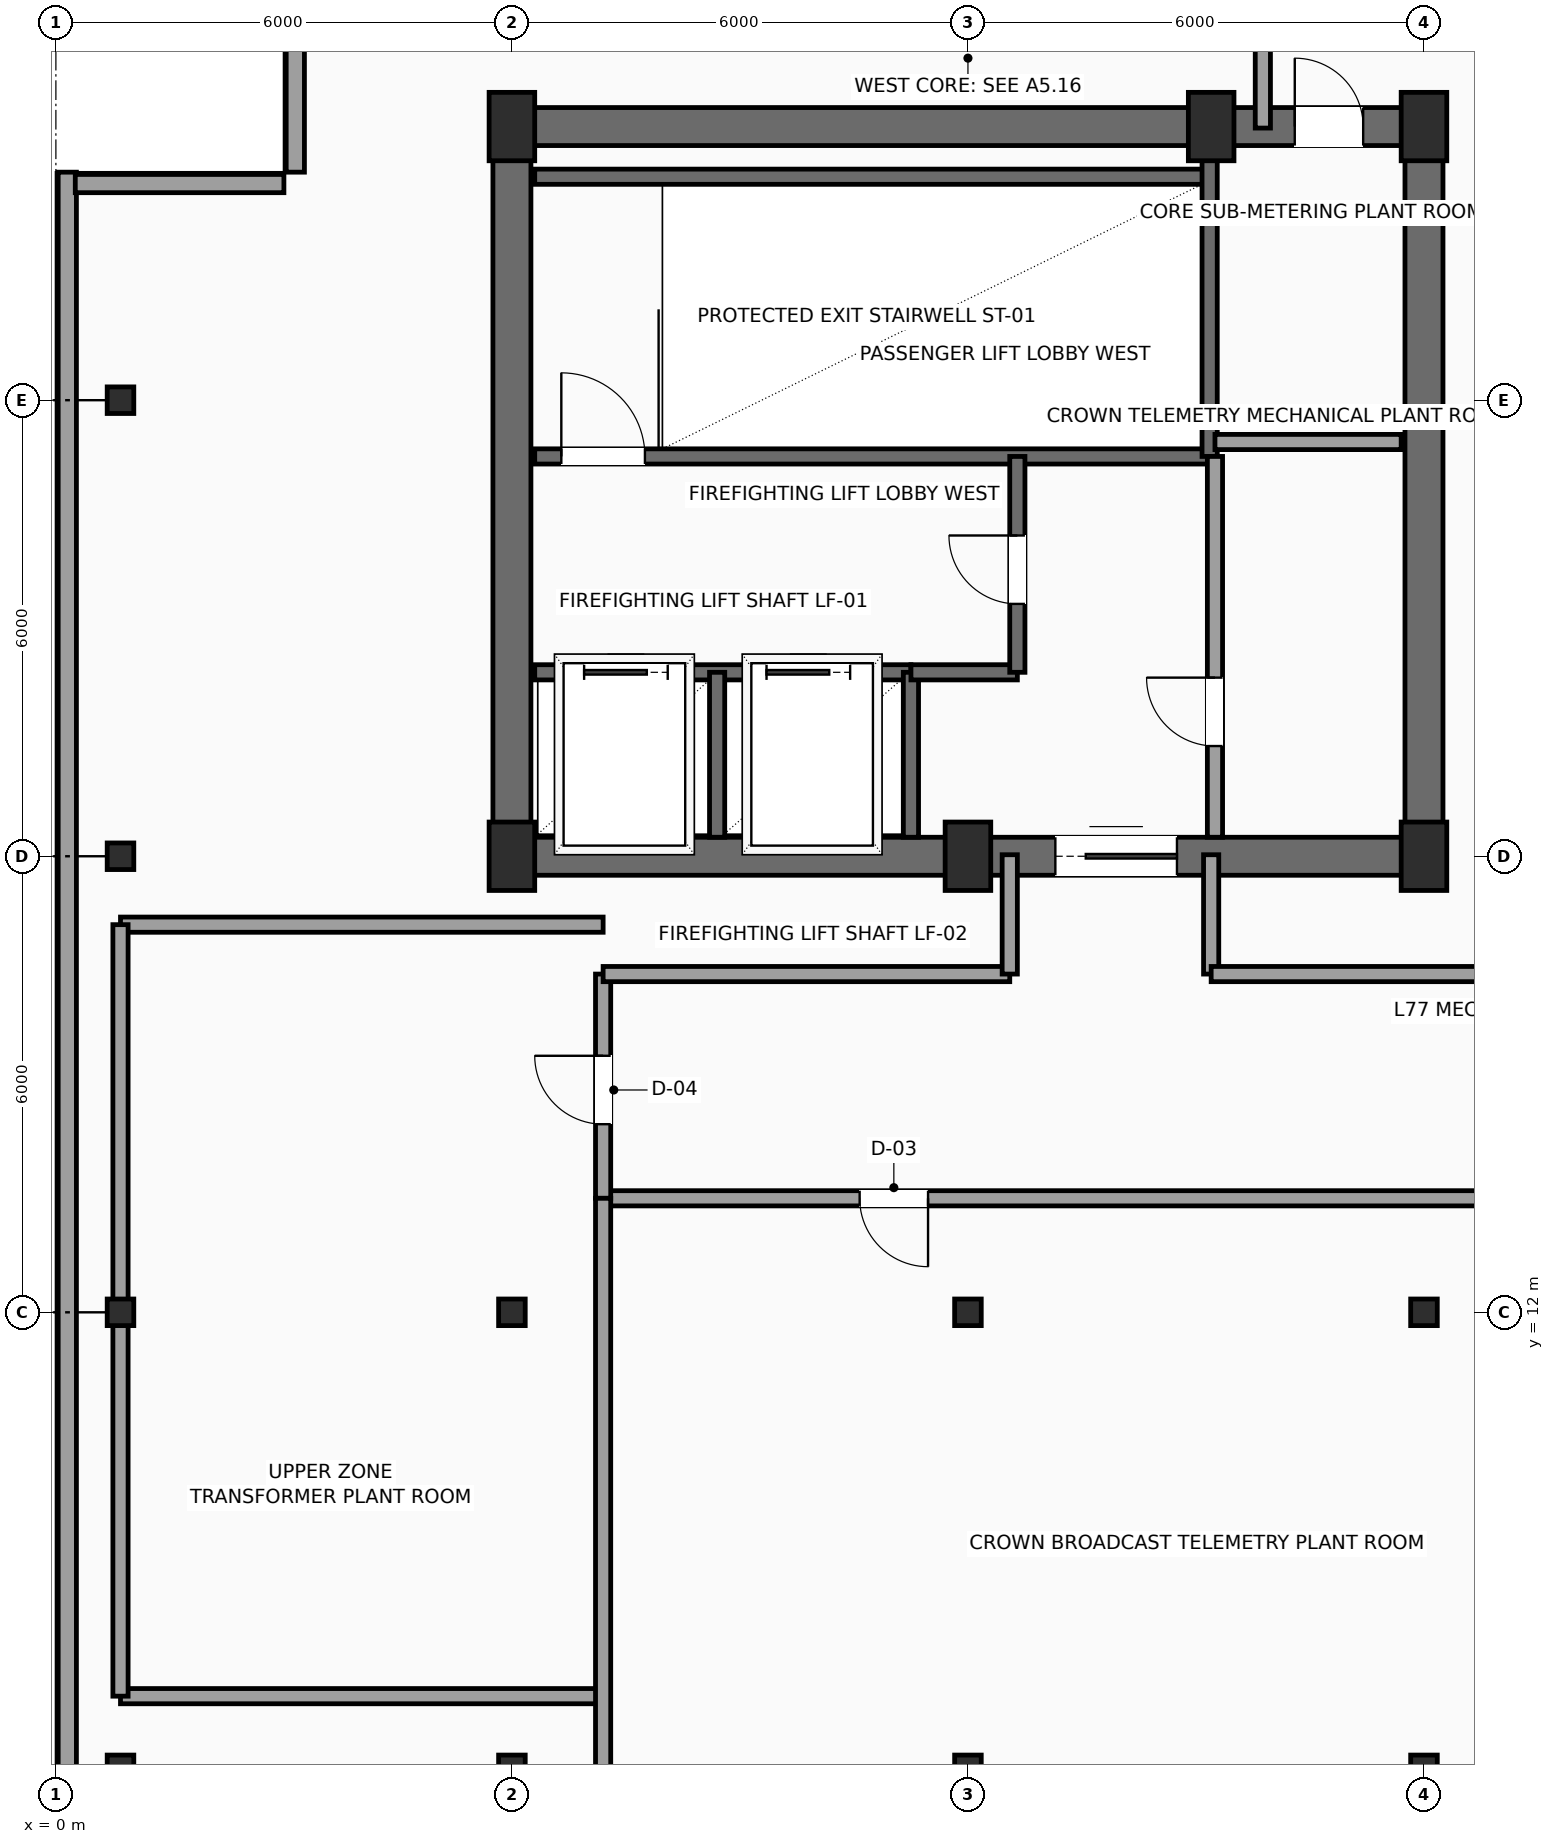
"""IFC4 building model, lengths in metres.
Left out: names, types, materials, properties, quantities, classifications, styles, units other than length and angle.
Written with IfcOpenShell. Run it as: python <this file> out.ifc"""

import sys

from ifc_helpers import new_model, si_unit, direction, frame, frame_2d, origin, origin_2d, place, context, subcontext, project, spatial, rectangle, hollow_rectangle, extrude, element, fill, save


model = new_model("IFC4")
c1 = context("Model", 3, precision=1e-05, world=origin(), true_north=direction((0.0, 1.0)))
c2 = subcontext(c1, "Body", "Model", "MODEL_VIEW")
j1 = project(units=[si_unit("LENGTHUNIT", "METRE"), si_unit("PLANEANGLEUNIT", "RADIAN")], contexts=[c1])
p1 = place(None, origin())
s1 = spatial("IfcSite", under=j1, at=p1, CompositionType="ELEMENT")
p2 = place(p1, origin())
s2 = spatial("IfcBuilding", under=s1, at=p2, CompositionType="ELEMENT")
p3 = place(p2, frame((0.0, 0.0, 305.7)))
s3 = spatial("IfcBuildingStorey", under=s2, at=p3, CompositionType="ELEMENT", Elevation=305.7)
for number, where, z_axis, x_axis in (
    (1, (6.0, 18.0, 0.0), (0.0, 0.0, 1.0), (1.0, 0.0, 0.0)),
    (2, (12.0, 18.0, 0.0), (0.0, 0.0, 1.0), (1.0, 0.0, 0.0)),
    (3, (18.0, 18.0, 0.0), (0.0, 0.0, 1.0), (1.0, 0.0, 0.0)),
    (4, (6.0, 27.6, 0.0), (0.0, 0.0, 1.0), (1.0, 0.0, 0.0)),
    (5, (15.2, 27.6, 0.0), (0.0, 0.0, 1.0), (1.0, 0.0, 0.0)),
    (6, (18.0, 27.6, 0.0), (0.0, 0.0, 1.0), (1.0, 0.0, 0.0)),
):
    element("IfcColumn", number, at=place(p3, frame(where, z_axis=z_axis, x_axis=x_axis)), inside=s3, PredefinedType="COLUMN", context=c2, shape_type="SweptSolid", body=[
        extrude(rectangle(XDim=0.6, YDim=0.9, at=origin_2d()), origin(), (0.0, 0.0, 1.0), 4.8),
    ])
for number, where, z_axis, x_axis in (
    (7, (0.85, 6.0, 0.0), (0.0, 0.0, 1.0), (1.0, 0.0, 0.0)),
    (8, (0.85, 12.0, 0.0), (0.0, 0.0, 1.0), (1.0, 0.0, 0.0)),
    (9, (0.85, 18.0, 0.0), (0.0, 0.0, 1.0), (1.0, 0.0, 0.0)),
    (10, (0.85, 24.0, 0.0), (0.0, 0.0, 1.0), (1.0, 0.0, 0.0)),
    (11, (6.0, 6.0, 0.0), (0.0, 0.0, 1.0), (1.0, 0.0, 0.0)),
    (12, (6.0, 12.0, 0.0), (0.0, 0.0, 1.0), (1.0, 0.0, 0.0)),
    (13, (12.0, 6.0, 0.0), (0.0, 0.0, 1.0), (1.0, 0.0, 0.0)),
    (14, (12.0, 12.0, 0.0), (0.0, 0.0, 1.0), (1.0, 0.0, 0.0)),
    (15, (18.0, 6.0, 0.0), (0.0, 0.0, 1.0), (1.0, 0.0, 0.0)),
    (16, (18.0, 12.0, 0.0), (0.0, 0.0, 1.0), (1.0, 0.0, 0.0)),
):
    element("IfcColumn", number, at=place(p3, frame(where, z_axis=z_axis, x_axis=x_axis)), inside=s3, PredefinedType="COLUMN", context=c2, shape_type="SweptSolid", body=[
        extrude(hollow_rectangle(XDim=0.35, YDim=0.35, WallThickness=0.016, InnerFilletRadius=0.016, OuterFilletRadius=0.032, at=origin_2d()), origin(), (0.0, 0.0, 1.0), 4.8),
    ])
p4 = place(p3, frame((0.15, 3.0, 0.0), z_axis=(0.0, 0.0, 1.0), x_axis=(0.0, 1.0, 0.0)))
e17 = element("IfcWall", 17, at=p4, inside=s3, PredefinedType="SOLIDWALL", context=c2, shape_type="SweptSolid", body=[
    extrude(rectangle(XDim=24.0, YDim=0.24, at=frame_2d((12.0, 0.0))), origin(), (0.0, 0.0, 1.0), 4.55),
])
for number, where, z_axis, x_axis in (
    (18, (0.255, 26.85, 0.0), (0.0, 0.0, 1.0), (1.0, 0.0, 0.0)),
    (19, (3.15, 27.0, 0.0), (0.0, 0.0, 1.0), (0.0, 1.0, 0.0)),
):
    element("IfcWall", number, at=place(p3, frame(where, z_axis=z_axis, x_axis=x_axis)), inside=s3, PredefinedType="SOLIDWALL", context=c2, shape_type="SweptSolid", body=[
        extrude(rectangle(XDim=2.745, YDim=0.24, at=frame_2d((1.373, 0.0))), origin(), (0.0, 0.0, 1.0), 4.55),
    ])
p5 = place(p3, frame((6.0, 18.0, 0.0), z_axis=(0.0, 0.0, 1.0), x_axis=(1.0, 0.0, 0.0)))
e20 = element("IfcWall", 20, at=p5, inside=s3, PredefinedType="SHEAR", context=c2, shape_type="SweptSolid", body=[
    extrude(rectangle(XDim=12.0, YDim=0.5, at=frame_2d((6.0, 0.0))), origin(), (0.0, 0.0, 1.0), 4.55),
])
p6 = place(p5, frame((7.15, 0.0, 0.0)))
e21 = element("IfcOpeningElement", 21, at=p6, cuts=e20, PredefinedType="OPENING", context=c2, shape_type="SweptSolid", body=[
    extrude(rectangle(XDim=1.6, YDim=2.3, at=frame_2d((0.8, 1.15))), frame((0.0, 0.26, 0.0), z_axis=(0.0, -1.0, 0.0), x_axis=(1.0, 0.0, 0.0)), (0.0, 0.0, 1.0), 0.52),
])
p7 = place(p3, frame((6.0, 27.6, 0.0), z_axis=(0.0, 0.0, 1.0), x_axis=(1.0, 0.0, 0.0)))
e22 = element("IfcWall", 22, at=p7, inside=s3, PredefinedType="SHEAR", context=c2, shape_type="SweptSolid", body=[
    extrude(rectangle(XDim=12.0, YDim=0.5, at=frame_2d((6.0, 0.0))), origin(), (0.0, 0.0, 1.0), 4.55),
])
p8 = place(p7, frame((10.3, 0.0, 0.0)))
e23 = element("IfcOpeningElement", 23, at=p8, cuts=e22, PredefinedType="OPENING", context=c2, shape_type="SweptSolid", body=[
    extrude(rectangle(XDim=0.9, YDim=2.15, at=frame_2d((0.45, 1.075))), frame((0.0, 0.26, 0.0), z_axis=(0.0, -1.0, 0.0), x_axis=(1.0, 0.0, 0.0)), (0.0, 0.0, 1.0), 0.52),
])
for number, where, z_axis, x_axis in (
    (24, (6.0, 18.0, 0.0), (0.0, 0.0, 1.0), (0.0, 1.0, 0.0)),
    (25, (18.0, 18.0, 0.0), (0.0, 0.0, 1.0), (0.0, 1.0, 0.0)),
):
    element("IfcWall", number, at=place(p3, frame(where, z_axis=z_axis, x_axis=x_axis)), inside=s3, PredefinedType="SHEAR", context=c2, shape_type="SweptSolid", body=[
        extrude(rectangle(XDim=9.6, YDim=0.5, at=frame_2d((4.8, 0.0))), origin(), (0.0, 0.0, 1.0), 4.55),
    ])
p9 = place(p3, frame((6.3, 23.26, 0.0), z_axis=(0.0, 0.0, 1.0), x_axis=(1.0, 0.0, 0.0)))
e26 = element("IfcWall", 26, at=p9, inside=s3, PredefinedType="SHEAR", context=c2, shape_type="SweptSolid", body=[
    extrude(rectangle(XDim=8.88, YDim=0.2, at=frame_2d((4.44, 0.0))), origin(), (0.0, 0.0, 1.0), 4.55),
])
p10 = place(p9, frame((0.35, 0.0, 0.0)))
e27 = element("IfcOpeningElement", 27, at=p10, cuts=e26, PredefinedType="OPENING", context=c2, shape_type="SweptSolid", body=[
    extrude(rectangle(XDim=1.1, YDim=2.2, at=frame_2d((0.55, 1.1))), frame((0.0, 0.11, 0.0), z_axis=(0.0, -1.0, 0.0), x_axis=(1.0, 0.0, 0.0)), (0.0, 0.0, 1.0), 0.22),
])
p11 = place(p3, frame((6.3, 26.94, 0.0), z_axis=(0.0, 0.0, 1.0), x_axis=(1.0, 0.0, 0.0)))
e28 = element("IfcWall", 28, at=p11, inside=s3, PredefinedType="SHEAR", context=c2, shape_type="SweptSolid", body=[
    extrude(rectangle(XDim=8.88, YDim=0.2, at=frame_2d((4.44, 0.0))), origin(), (0.0, 0.0, 1.0), 4.55),
])
p12 = place(p3, frame((15.18, 23.26, 0.0), z_axis=(0.0, 0.0, 1.0), x_axis=(0.0, 1.0, 0.0)))
e29 = element("IfcWall", 29, at=p12, inside=s3, PredefinedType="SHEAR", context=c2, shape_type="SweptSolid", body=[
    extrude(rectangle(XDim=4.04, YDim=0.2, at=frame_2d((2.02, 0.0))), origin(), (0.0, 0.0, 1.0), 4.55),
])
p13 = place(p3, frame((6.3, 20.42, 0.0), z_axis=(0.0, 0.0, 1.0), x_axis=(1.0, 0.0, 0.0)))
e30 = element("IfcWall", 30, at=p13, inside=s3, PredefinedType="SHEAR", context=c2, shape_type="SweptSolid", body=[
    extrude(rectangle(XDim=4.95, YDim=0.2, at=frame_2d((2.475, 0.0))), origin(), (0.0, 0.0, 1.0), 4.55),
])
p14 = place(p13, frame((0.65, 0.0, 0.0)))
e31 = element("IfcOpeningElement", 31, at=p14, cuts=e30, PredefinedType="OPENING", context=c2, shape_type="SweptSolid", body=[
    extrude(rectangle(XDim=1.1, YDim=2.2, at=frame_2d((0.55, 1.1))), frame((0.0, 0.11, 0.0), z_axis=(0.0, -1.0, 0.0), x_axis=(1.0, 0.0, 0.0)), (0.0, 0.0, 1.0), 0.22),
])
p15 = place(p13, frame((3.05, 0.0, 0.0)))
e32 = element("IfcOpeningElement", 32, at=p15, cuts=e30, PredefinedType="OPENING", context=c2, shape_type="SweptSolid", body=[
    extrude(rectangle(XDim=1.1, YDim=2.2, at=frame_2d((0.55, 1.1))), frame((0.0, 0.11, 0.0), z_axis=(0.0, -1.0, 0.0), x_axis=(1.0, 0.0, 0.0)), (0.0, 0.0, 1.0), 0.22),
])
for number, where, z_axis, x_axis in (
    (33, (8.7, 18.25, 0.0), (0.0, 0.0, 1.0), (0.0, 1.0, 0.0)),
    (34, (11.25, 18.25, 0.0), (0.0, 0.0, 1.0), (0.0, 1.0, 0.0)),
):
    element("IfcWall", number, at=place(p3, frame(where, z_axis=z_axis, x_axis=x_axis)), inside=s3, PredefinedType="SHEAR", context=c2, shape_type="SweptSolid", body=[
        extrude(rectangle(XDim=2.17, YDim=0.2, at=frame_2d((1.085, 0.0))), origin(), (0.0, 0.0, 1.0), 4.55),
    ])
p16 = place(p3, frame((11.25, 20.42, 0.0), z_axis=(0.0, 0.0, 1.0), x_axis=(1.0, 0.0, 0.0)))
e35 = element("IfcWall", 35, at=p16, inside=s3, PredefinedType="SHEAR", context=c2, shape_type="SweptSolid", body=[
    extrude(rectangle(XDim=1.4, YDim=0.2, at=frame_2d((0.7, 0.0))), origin(), (0.0, 0.0, 1.0), 4.55),
])
p17 = place(p3, frame((12.65, 20.42, 0.0), z_axis=(0.0, 0.0, 1.0), x_axis=(0.0, 1.0, 0.0)))
e36 = element("IfcWall", 36, at=p17, inside=s3, PredefinedType="SHEAR", context=c2, shape_type="SweptSolid", body=[
    extrude(rectangle(XDim=2.84, YDim=0.2, at=frame_2d((1.42, 0.0))), origin(), (0.0, 0.0, 1.0), 4.55),
])
p18 = place(p17, frame((0.9, 0.0, 0.0)))
e37 = element("IfcOpeningElement", 37, at=p18, cuts=e36, PredefinedType="OPENING", context=c2, shape_type="SweptSolid", body=[
    extrude(rectangle(XDim=0.9, YDim=2.15, at=frame_2d((0.45, 1.075))), frame((0.0, 0.11, 0.0), z_axis=(0.0, -1.0, 0.0), x_axis=(1.0, 0.0, 0.0)), (0.0, 0.0, 1.0), 0.22),
])
p19 = place(p3, frame((15.25, 18.25, 0.0), z_axis=(0.0, 0.0, 1.0), x_axis=(0.0, 1.0, 0.0)))
e38 = element("IfcWall", 38, at=p19, inside=s3, PredefinedType="SOLIDWALL", context=c2, shape_type="SweptSolid", body=[
    extrude(rectangle(XDim=5.01, YDim=0.2, at=frame_2d((2.505, 0.0))), origin(), (0.0, 0.0, 1.0), 4.55),
])
p20 = place(p19, frame((1.2, 0.0, 0.0)))
e39 = element("IfcOpeningElement", 39, at=p20, cuts=e38, PredefinedType="OPENING", context=c2, shape_type="SweptSolid", body=[
    extrude(rectangle(XDim=0.9, YDim=2.15, at=frame_2d((0.45, 1.075))), frame((0.0, 0.11, 0.0), z_axis=(0.0, -1.0, 0.0), x_axis=(1.0, 0.0, 0.0)), (0.0, 0.0, 1.0), 0.22),
])
p21 = place(p3, frame((15.25, 23.45, 0.0), z_axis=(0.0, 0.0, 1.0), x_axis=(1.0, 0.0, 0.0)))
e40 = element("IfcWall", 40, at=p21, inside=s3, PredefinedType="SOLIDWALL", context=c2, shape_type="SweptSolid", body=[
    extrude(rectangle(XDim=2.45, YDim=0.2, at=frame_2d((1.225, 0.0))), origin(), (0.0, 0.0, 1.0), 4.55),
])
p22 = place(p3, frame((20.75, 13.5, 0.0), z_axis=(0.0, 0.0, 1.0), x_axis=(-1.0, 0.0, 0.0)))
e41 = element("IfcWall", 41, at=p22, inside=s3, PredefinedType="SOLIDWALL", context=c2, shape_type="SweptSolid", body=[
    extrude(rectangle(XDim=13.55, YDim=0.2, at=frame_2d((6.775, 0.0))), origin(), (0.0, 0.0, 1.0), 4.55),
])
p23 = place(p22, frame((9.275, 0.0, 0.0)))
e42 = element("IfcOpeningElement", 42, at=p23, cuts=e41, PredefinedType="OPENING", context=c2, shape_type="SweptSolid", body=[
    extrude(rectangle(XDim=0.9, YDim=2.15, at=frame_2d((0.45, 1.075))), frame((0.0, 0.11, 0.0), z_axis=(0.0, -1.0, 0.0), x_axis=(1.0, 0.0, 0.0)), (0.0, 0.0, 1.0), 0.22),
])
p24 = place(p3, frame((7.2, 13.5, 0.0), z_axis=(0.0, 0.0, 1.0), x_axis=(0.0, 1.0, 0.0)))
e43 = element("IfcWall", 43, at=p24, inside=s3, PredefinedType="SOLIDWALL", context=c2, shape_type="SweptSolid", body=[
    extrude(rectangle(XDim=2.95, YDim=0.2, at=frame_2d((1.475, 0.0))), origin(), (0.0, 0.0, 1.0), 4.55),
])
p25 = place(p24, frame((0.975, 0.0, 0.0)))
e44 = element("IfcOpeningElement", 44, at=p25, cuts=e43, PredefinedType="OPENING", context=c2, shape_type="SweptSolid", body=[
    extrude(rectangle(XDim=0.9, YDim=2.15, at=frame_2d((0.45, 1.075))), frame((0.0, 0.11, 0.0), z_axis=(0.0, -1.0, 0.0), x_axis=(1.0, 0.0, 0.0)), (0.0, 0.0, 1.0), 0.22),
])
p26 = place(p3, frame((7.2, 16.45, 0.0), z_axis=(0.0, 0.0, 1.0), x_axis=(1.0, 0.0, 0.0)))
e45 = element("IfcWall", 45, at=p26, inside=s3, PredefinedType="SOLIDWALL", context=c2, shape_type="SweptSolid", body=[
    extrude(rectangle(XDim=5.35, YDim=0.2, at=frame_2d((2.675, 0.0))), origin(), (0.0, 0.0, 1.0), 4.55),
])
for number, where, z_axis, x_axis in (
    (46, (12.55, 16.45, 0.0), (0.0, 0.0, 1.0), (0.0, 1.0, 0.0)),
    (47, (15.2, 18.02, 0.0), (0.0, 0.0, 1.0), (0.0, -1.0, 0.0)),
):
    element("IfcWall", number, at=place(p3, frame(where, z_axis=z_axis, x_axis=x_axis)), inside=s3, PredefinedType="SOLIDWALL", context=c2, shape_type="SweptSolid", body=[
        extrude(rectangle(XDim=1.57, YDim=0.2, at=frame_2d((0.785, 0.0))), origin(), (0.0, 0.0, 1.0), 4.55),
    ])
p27 = place(p3, frame((15.2, 16.45, 0.0), z_axis=(0.0, 0.0, 1.0), x_axis=(1.0, 0.0, 0.0)))
e48 = element("IfcWall", 48, at=p27, inside=s3, PredefinedType="SOLIDWALL", context=c2, shape_type="SweptSolid", body=[
    extrude(rectangle(XDim=3.75, YDim=0.2, at=frame_2d((1.875, 0.0))), origin(), (0.0, 0.0, 1.0), 4.55),
])
p28 = place(p3, frame((15.88, 27.58, 0.0), z_axis=(0.0, 0.0, 1.0), x_axis=(0.0, 1.0, 0.0)))
e49 = element("IfcWall", 49, at=p28, inside=s3, PredefinedType="SOLIDWALL", context=c2, shape_type="SweptSolid", body=[
    extrude(rectangle(XDim=2.12, YDim=0.2, at=frame_2d((1.06, 0.0))), origin(), (0.0, 0.0, 1.0), 4.55),
])
for number, where, z_axis, x_axis in (
    (50, (0.85, 6.95, 0.0), (0.0, 0.0, 1.0), (1.0, 0.0, 0.0)),
    (51, (0.85, 17.1, 0.0), (0.0, 0.0, 1.0), (1.0, 0.0, 0.0)),
):
    element("IfcWall", number, at=place(p3, frame(where, z_axis=z_axis, x_axis=x_axis)), inside=s3, PredefinedType="SOLIDWALL", context=c2, shape_type="SweptSolid", body=[
        extrude(rectangle(XDim=6.35, YDim=0.2, at=frame_2d((3.175, 0.0))), origin(), (0.0, 0.0, 1.0), 4.55),
    ])
p29 = place(p3, frame((0.85, 6.95, 0.0), z_axis=(0.0, 0.0, 1.0), x_axis=(0.0, 1.0, 0.0)))
e52 = element("IfcWall", 52, at=p29, inside=s3, PredefinedType="SOLIDWALL", context=c2, shape_type="SweptSolid", body=[
    extrude(rectangle(XDim=10.15, YDim=0.2, at=frame_2d((5.075, 0.0))), origin(), (0.0, 0.0, 1.0), 4.242),
])
p30 = place(p3, frame((7.2, 1.75, 0.0), z_axis=(0.0, 0.0, 1.0), x_axis=(0.0, 1.0, 0.0)))
e53 = element("IfcWall", 53, at=p30, inside=s3, PredefinedType="SOLIDWALL", context=c2, shape_type="SweptSolid", body=[
    extrude(rectangle(XDim=11.75, YDim=0.2, at=frame_2d((5.875, 0.0))), origin(), (0.0, 0.0, 1.0), 4.55),
])
p31 = place(p6, origin())
e54 = element("IfcDoor", 54, at=p31, inside=s3, OperationType="DOUBLE_DOOR_SLIDING", PredefinedType="DOOR", context=c2, shape_type="SweptSolid", body=[
    extrude(rectangle(XDim=1.6, YDim=2.3, at=frame_2d((0.8, 1.15))), frame((0.0, 0.025, 0.0), z_axis=(0.0, -1.0, 0.0), x_axis=(1.0, 0.0, 0.0)), (0.0, 0.0, 1.0), 0.05),
])
fill(e21, e54)
p32 = place(p8, origin())
e55 = element("IfcDoor", 55, at=p32, inside=s3, OperationType="SINGLE_SWING_LEFT", PredefinedType="DOOR", context=c2, shape_type="SweptSolid", body=[
    extrude(rectangle(XDim=0.9, YDim=2.15, at=frame_2d((0.45, 1.075))), frame((0.0, 0.025, 0.0), z_axis=(0.0, -1.0, 0.0), x_axis=(1.0, 0.0, 0.0)), (0.0, 0.0, 1.0), 0.05),
])
fill(e23, e55)
p33 = place(p10, origin())
e56 = element("IfcDoor", 56, at=p33, inside=s3, OperationType="SINGLE_SWING_LEFT", PredefinedType="DOOR", context=c2, shape_type="SweptSolid", body=[
    extrude(rectangle(XDim=1.1, YDim=2.2, at=frame_2d((0.55, 1.1))), frame((0.0, 0.025, 0.0), z_axis=(0.0, -1.0, 0.0), x_axis=(1.0, 0.0, 0.0)), (0.0, 0.0, 1.0), 0.05),
])
fill(e27, e56)
p34 = place(p14, origin())
e57 = element("IfcDoor", 57, at=p34, inside=s3, OperationType="SLIDING_TO_LEFT", PredefinedType="DOOR", context=c2, shape_type="SweptSolid", body=[
    extrude(rectangle(XDim=1.1, YDim=2.2, at=frame_2d((0.55, 1.1))), frame((0.0, 0.025, 0.0), z_axis=(0.0, -1.0, 0.0), x_axis=(1.0, 0.0, 0.0)), (0.0, 0.0, 1.0), 0.05),
])
fill(e31, e57)
p35 = place(p15, origin())
e58 = element("IfcDoor", 58, at=p35, inside=s3, OperationType="SLIDING_TO_LEFT", PredefinedType="DOOR", context=c2, shape_type="SweptSolid", body=[
    extrude(rectangle(XDim=1.1, YDim=2.2, at=frame_2d((0.55, 1.1))), frame((0.0, 0.025, 0.0), z_axis=(0.0, -1.0, 0.0), x_axis=(1.0, 0.0, 0.0)), (0.0, 0.0, 1.0), 0.05),
])
fill(e32, e58)
p36 = place(p18, origin())
e59 = element("IfcDoor", 59, at=p36, inside=s3, OperationType="SINGLE_SWING_RIGHT", PredefinedType="DOOR", context=c2, shape_type="SweptSolid", body=[
    extrude(rectangle(XDim=0.9, YDim=2.15, at=frame_2d((0.45, 1.075))), frame((0.0, 0.025, 0.0), z_axis=(0.0, -1.0, 0.0), x_axis=(1.0, 0.0, 0.0)), (0.0, 0.0, 1.0), 0.05),
])
fill(e37, e59)
p37 = place(p20, origin())
e60 = element("IfcDoor", 60, at=p37, inside=s3, OperationType="SINGLE_SWING_RIGHT", PredefinedType="DOOR", context=c2, shape_type="SweptSolid", body=[
    extrude(rectangle(XDim=0.9, YDim=2.15, at=frame_2d((0.45, 1.075))), frame((0.0, 0.025, 0.0), z_axis=(0.0, -1.0, 0.0), x_axis=(1.0, 0.0, 0.0)), (0.0, 0.0, 1.0), 0.05),
])
fill(e39, e60)
p38 = place(p23, origin())
e61 = element("IfcDoor", 61, at=p38, inside=s3, OperationType="SINGLE_SWING_LEFT", PredefinedType="DOOR", context=c2, shape_type="SweptSolid", body=[
    extrude(rectangle(XDim=0.9, YDim=2.15, at=frame_2d((0.45, 1.075))), frame((0.0, 0.025, 0.0), z_axis=(0.0, -1.0, 0.0), x_axis=(1.0, 0.0, 0.0)), (0.0, 0.0, 1.0), 0.05),
])
fill(e42, e61)
p39 = place(p25, origin())
e62 = element("IfcDoor", 62, at=p39, inside=s3, OperationType="SINGLE_SWING_RIGHT", PredefinedType="DOOR", context=c2, shape_type="SweptSolid", body=[
    extrude(rectangle(XDim=0.9, YDim=2.15, at=frame_2d((0.45, 1.075))), frame((0.0, 0.025, 0.0), z_axis=(0.0, -1.0, 0.0), x_axis=(1.0, 0.0, 0.0)), (0.0, 0.0, 1.0), 0.05),
])
fill(e44, e62)
save(model, sys.argv[1])
